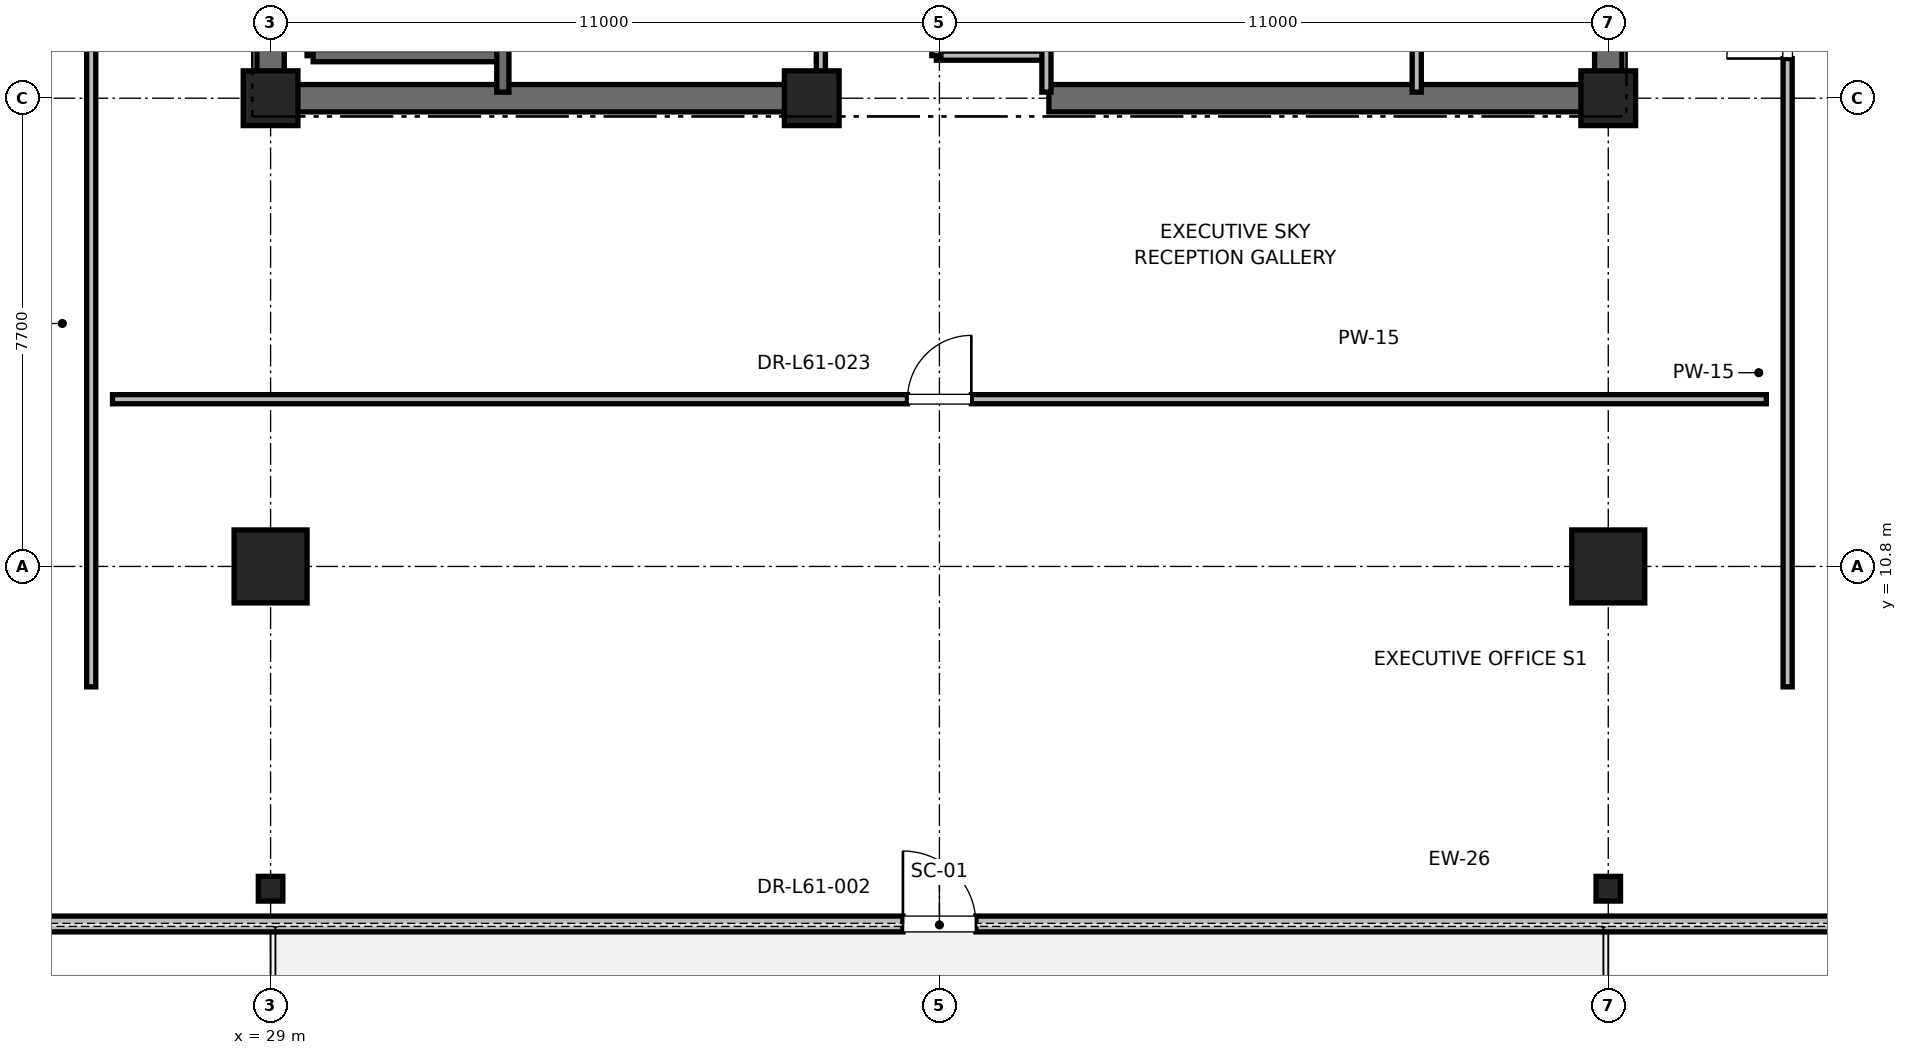
"""IFC4 building model, lengths in metres.
Left out: names, types, materials, properties, quantities, classifications, styles, units other than length and angle.
Written with IfcOpenShell. Run it as: python <this file> out.ifc"""

import sys

from ifc_helpers import new_model, si_unit, direction, frame, frame_2d, origin, origin_2d, place, context, subcontext, project, spatial, rectangle, i_section, extrude, element, fill, save


model = new_model("IFC4")
c1 = context("Model", 3, precision=1e-05, world=origin(), true_north=direction((0.0, 1.0)))
c2 = subcontext(c1, "Body", "Model", "MODEL_VIEW")
j1 = project(units=[si_unit("LENGTHUNIT", "METRE"), si_unit("PLANEANGLEUNIT", "RADIAN")], contexts=[c1])
p1 = place(None, origin())
s1 = spatial("IfcSite", under=j1, at=p1, CompositionType="ELEMENT")
p2 = place(p1, origin())
s2 = spatial("IfcBuilding", under=s1, at=p2, CompositionType="ELEMENT")
p3 = place(p2, frame((0.0, 0.0, 263.2)))
s3 = spatial("IfcBuildingStorey", under=s2, at=p3, CompositionType="ELEMENT", Elevation=263.2)
for number, where, z_axis, x_axis in (
    (1, (29.0, 10.8, 0.0), (0.0, 0.0, 1.0), (1.0, 0.0, 0.0)),
    (2, (51.0, 10.8, 0.0), (0.0, 0.0, 1.0), (1.0, 0.0, 0.0)),
):
    element("IfcColumn", number, at=place(p3, frame(where, z_axis=z_axis, x_axis=x_axis)), inside=s3, PredefinedType="COLUMN", context=c2, shape_type="SweptSolid", body=[
        extrude(rectangle(XDim=1.2, YDim=1.2, at=origin_2d()), origin(), (0.0, 0.0, 1.0), 4.0),
    ])
for number, where, z_axis, x_axis in (
    (3, (29.0, 5.5, 0.0), (0.0, 0.0, 1.0), (1.0, 0.0, 0.0)),
    (4, (51.0, 5.5, 0.0), (0.0, 0.0, 1.0), (1.0, 0.0, 0.0)),
):
    element("IfcColumn", number, at=place(p3, frame(where, z_axis=z_axis, x_axis=x_axis)), inside=s3, PredefinedType="COLUMN", context=c2, shape_type="SweptSolid", body=[
        extrude(i_section(OverallWidth=0.403, OverallDepth=0.406, WebThickness=0.027, FlangeThickness=0.043, FilletRadius=0.015, at=origin_2d()), origin(), (0.0, 0.0, 1.0), 4.0),
    ])
for number, where, z_axis, x_axis in (
    (5, (29.0, 18.5, 0.0), (0.0, 0.0, 1.0), (1.0, 0.0, 0.0)),
    (6, (51.0, 18.5, 0.0), (0.0, 0.0, 1.0), (1.0, 0.0, 0.0)),
    (7, (37.9, 18.5, 0.0), (0.0, 0.0, 1.0), (1.0, 0.0, 0.0)),
):
    element("IfcColumn", number, at=place(p3, frame(where, z_axis=z_axis, x_axis=x_axis)), inside=s3, PredefinedType="PILASTER", context=c2, shape_type="SweptSolid", body=[
        extrude(rectangle(XDim=0.9, YDim=0.9, at=origin_2d()), origin(), (0.0, 0.0, 1.0), 4.0),
    ])
for number, where, z_axis, x_axis in (
    (8, (29.0, 18.5, 0.0), (0.0, 0.0, 1.0), (1.0, 0.0, 0.0)),
    (9, (41.8, 18.5, 0.0), (0.0, 0.0, 1.0), (1.0, 0.0, 0.0)),
):
    element("IfcWall", number, at=place(p3, frame(where, z_axis=z_axis, x_axis=x_axis)), inside=s3, PredefinedType="SHEAR", context=c2, shape_type="SweptSolid", body=[
        extrude(rectangle(XDim=9.2, YDim=0.45, at=frame_2d((4.6, 0.0))), origin(), (0.0, 0.0, 1.0), 3.785),
    ])
p4 = place(p3, frame((29.0, 18.5, 0.0), z_axis=(0.0, 0.0, 1.0), x_axis=(0.0, 1.0, 0.0)))
e10 = element("IfcWall", 10, at=p4, inside=s3, PredefinedType="SHEAR", context=c2, shape_type="SweptSolid", body=[
    extrude(rectangle(XDim=8.8, YDim=0.45, at=frame_2d((4.4, 0.0))), origin(), (0.0, 0.0, 1.0), 3.785),
])
p5 = place(p3, frame((51.0, 18.5, 0.0), z_axis=(0.0, 0.0, 1.0), x_axis=(0.0, 1.0, 0.0)))
e11 = element("IfcWall", 11, at=p5, inside=s3, PredefinedType="SHEAR", context=c2, shape_type="SweptSolid", body=[
    extrude(rectangle(XDim=5.8, YDim=0.45, at=frame_2d((2.9, 0.0))), origin(), (0.0, 0.0, 1.0), 3.785),
])
p6 = place(p3, frame((17.692, 4.92, 0.0), z_axis=(0.0, 0.0, 1.0), x_axis=(1.0, 0.0, 0.0)))
e12 = element("IfcWall", 12, at=p6, inside=s3, PredefinedType="PARAPET", context=c2, shape_type="SweptSolid", body=[
    extrude(rectangle(XDim=44.615, YDim=0.26, at=frame_2d((22.308, 0.0))), origin(), (0.0, 0.0, 1.0), 3.123),
])
p7 = place(p6, frame((4.2, 0.0, 0.85)))
e13 = element("IfcOpeningElement", 13, at=p7, cuts=e12, PredefinedType="OPENING", context=c2, shape_type="SweptSolid", body=[
    extrude(rectangle(XDim=1.6, YDim=2.1, at=frame_2d((0.8, 1.05))), frame((0.0, 0.13, 0.0), z_axis=(0.0, -1.0, 0.0), x_axis=(1.0, 0.0, 0.0)), (0.0, 0.0, 1.0), 0.26),
])
p8 = place(p6, frame((21.708, 0.0, 0.0)))
e14 = element("IfcOpeningElement", 14, at=p8, cuts=e12, PredefinedType="OPENING", context=c2, shape_type="SweptSolid", body=[
    extrude(rectangle(XDim=1.2, YDim=2.2, at=frame_2d((0.6, 1.1))), frame((0.0, 0.13, 0.0), z_axis=(0.0, -1.0, 0.0), x_axis=(1.0, 0.0, 0.0)), (0.0, 0.0, 1.0), 0.26),
])
p9 = place(p6, frame((38.815, 0.0, 0.85)))
e15 = element("IfcOpeningElement", 15, at=p9, cuts=e12, PredefinedType="OPENING", context=c2, shape_type="SweptSolid", body=[
    extrude(rectangle(XDim=1.6, YDim=2.1, at=frame_2d((0.8, 1.05))), frame((0.0, 0.13, 0.0), z_axis=(0.0, -1.0, 0.0), x_axis=(1.0, 0.0, 0.0)), (0.0, 0.0, 1.0), 0.26),
])
p10 = place(p3, frame((29.7, 19.2, 0.0), z_axis=(0.0, 0.0, 1.0), x_axis=(0.0, 1.0, 0.0)))
e16 = element("IfcWall", 16, at=p10, inside=s3, PredefinedType="SOLIDWALL", context=c2, shape_type="SweptSolid", body=[
    extrude(rectangle(XDim=8.15, YDim=0.2, at=frame_2d((4.075, 0.0))), origin(), (0.0, 0.0, 1.0), 3.785),
])
p11 = place(p3, frame((29.7, 19.2, 0.0), z_axis=(0.0, 0.0, 1.0), x_axis=(1.0, 0.0, 0.0)))
e17 = element("IfcWall", 17, at=p11, inside=s3, PredefinedType="SOLIDWALL", context=c2, shape_type="SweptSolid", body=[
    extrude(rectangle(XDim=3.12, YDim=0.2, at=frame_2d((1.56, 0.0))), origin(), (0.0, 0.0, 1.0), 3.785),
])
p12 = place(p3, frame((32.82, 18.6, 0.0), z_axis=(0.0, 0.0, 1.0), x_axis=(0.0, 1.0, 0.0)))
e18 = element("IfcWall", 18, at=p12, inside=s3, PredefinedType="SOLIDWALL", context=c2, shape_type="SweptSolid", body=[
    extrude(rectangle(XDim=8.78, YDim=0.2, at=frame_2d((4.39, 0.0))), origin(), (0.0, 0.0, 1.0), 3.785),
])
p13 = place(p3, frame((39.95, 19.2, 0.0), z_axis=(0.0, 0.0, 1.0), x_axis=(1.0, 0.0, 0.0)))
e19 = element("IfcWall", 19, at=p13, inside=s3, PredefinedType="PARTITIONING", context=c2, shape_type="SweptSolid", body=[
    extrude(rectangle(XDim=1.81, YDim=0.15, at=frame_2d((0.905, 0.0))), origin(), (0.0, 0.0, 1.0), 2.85),
])
p14 = place(p3, frame((41.76, 18.6, 0.0), z_axis=(0.0, 0.0, 1.0), x_axis=(0.0, 1.0, 0.0)))
e20 = element("IfcWall", 20, at=p14, inside=s3, PredefinedType="PARTITIONING", context=c2, shape_type="SweptSolid", body=[
    extrude(rectangle(XDim=3.6, YDim=0.15, at=frame_2d((1.8, 0.0))), origin(), (0.0, 0.0, 1.0), 2.85),
])
p15 = place(p3, frame((39.95, 19.2, 0.0), z_axis=(0.0, 0.0, 1.0), x_axis=(0.0, 1.0, 0.0)))
e21 = element("IfcWall", 21, at=p15, inside=s3, PredefinedType="PARTITIONING", context=c2, shape_type="SweptSolid", body=[
    extrude(rectangle(XDim=3.0, YDim=0.15, at=frame_2d((1.5, 0.0))), origin(), (0.0, 0.0, 1.0), 2.85),
])
p16 = place(p15, frame((1.05, 0.0, 0.0)))
e22 = element("IfcOpeningElement", 22, at=p16, cuts=e21, PredefinedType="OPENING", context=c2, shape_type="SweptSolid", body=[
    extrude(rectangle(XDim=0.9, YDim=2.1, at=frame_2d((0.45, 1.05))), frame((0.0, 0.075, 0.0), z_axis=(0.0, -1.0, 0.0), x_axis=(1.0, 0.0, 0.0)), (0.0, 0.0, 1.0), 0.15),
])
p17 = place(p3, frame((38.05, 18.6, 0.0), z_axis=(0.0, 0.0, 1.0), x_axis=(0.0, 1.0, 0.0)))
e23 = element("IfcWall", 23, at=p17, inside=s3, PredefinedType="PARTITIONING", context=c2, shape_type="SweptSolid", body=[
    extrude(rectangle(XDim=8.78, YDim=0.15, at=frame_2d((4.39, 0.0))), origin(), (0.0, 0.0, 1.0), 2.85),
])
p18 = place(p17, frame((3.89, 0.0, 0.0)))
e24 = element("IfcOpeningElement", 24, at=p18, cuts=e23, PredefinedType="OPENING", context=c2, shape_type="SweptSolid", body=[
    extrude(rectangle(XDim=1.0, YDim=2.15, at=frame_2d((0.5, 1.075))), frame((0.0, 0.075, 0.0), z_axis=(0.0, -1.0, 0.0), x_axis=(1.0, 0.0, 0.0)), (0.0, 0.0, 1.0), 0.15),
])
p19 = place(p3, frame((47.85, 18.6, 0.0), z_axis=(0.0, 0.0, 1.0), x_axis=(0.0, 1.0, 0.0)))
e25 = element("IfcWall", 25, at=p19, inside=s3, PredefinedType="PARTITIONING", context=c2, shape_type="SweptSolid", body=[
    extrude(rectangle(XDim=2.54, YDim=0.15, at=frame_2d((1.27, 0.0))), origin(), (0.0, 0.0, 1.0), 2.85),
])
p20 = place(p3, frame((26.4, 13.55, 0.0), z_axis=(0.0, 0.0, 1.0), x_axis=(1.0, 0.0, 0.0)))
e26 = element("IfcWall", 26, at=p20, inside=s3, PredefinedType="PARTITIONING", context=c2, shape_type="SweptSolid", body=[
    extrude(rectangle(XDim=27.2, YDim=0.15, at=frame_2d((13.6, 0.0))), origin(), (0.0, 0.0, 1.0), 2.85),
])
p21 = place(p20, frame((13.075, 0.0, 0.0)))
e27 = element("IfcOpeningElement", 27, at=p21, cuts=e26, PredefinedType="OPENING", context=c2, shape_type="SweptSolid", body=[
    extrude(rectangle(XDim=1.05, YDim=2.2, at=frame_2d((0.525, 1.1))), frame((0.0, 0.075, 0.0), z_axis=(0.0, -1.0, 0.0), x_axis=(1.0, 0.0, 0.0)), (0.0, 0.0, 1.0), 0.15),
])
p22 = place(p3, frame((26.05, 8.82, 0.0), z_axis=(0.0, 0.0, 1.0), x_axis=(0.0, 1.0, 0.0)))
e28 = element("IfcWall", 28, at=p22, inside=s3, PredefinedType="PARTITIONING", context=c2, shape_type="SweptSolid", body=[
    extrude(rectangle(XDim=15.691, YDim=0.15, at=frame_2d((7.846, 0.0))), origin(), (0.0, 0.0, 1.0), 2.85),
])
p23 = place(p22, frame((11.951, 0.0, 0.0)))
e29 = element("IfcOpeningElement", 29, at=p23, cuts=e28, PredefinedType="OPENING", context=c2, shape_type="SweptSolid", body=[
    extrude(rectangle(XDim=1.5, YDim=2.25, at=frame_2d((0.75, 1.125))), frame((0.0, 0.075, 0.0), z_axis=(0.0, -1.0, 0.0), x_axis=(1.0, 0.0, 0.0)), (0.0, 0.0, 1.0), 0.15),
])
p24 = place(p3, frame((53.95, 8.82, 0.0), z_axis=(0.0, 0.0, 1.0), x_axis=(0.0, 1.0, 0.0)))
e30 = element("IfcWall", 30, at=p24, inside=s3, PredefinedType="PARTITIONING", context=c2, shape_type="SweptSolid", body=[
    extrude(rectangle(XDim=11.955, YDim=0.15, at=frame_2d((5.978, 0.0))), origin(), (0.0, 0.0, 1.0), 2.85),
])
p25 = place(p24, frame((10.333, 0.0, 0.0)))
e31 = element("IfcOpeningElement", 31, at=p25, cuts=e30, PredefinedType="OPENING", context=c2, shape_type="SweptSolid", body=[
    extrude(rectangle(XDim=1.0, YDim=2.15, at=frame_2d((0.5, 1.075))), frame((0.0, 0.075, 0.0), z_axis=(0.0, -1.0, 0.0), x_axis=(1.0, 0.0, 0.0)), (0.0, 0.0, 1.0), 0.15),
])
p26 = place(p8, origin())
e32 = element("IfcDoor", 32, at=p26, inside=s3, OperationType="SINGLE_SWING_LEFT", PredefinedType="DOOR", context=c2, shape_type="SweptSolid", body=[
    extrude(rectangle(XDim=1.2, YDim=2.2, at=frame_2d((0.6, 1.1))), frame((0.0, 0.025, 0.0), z_axis=(0.0, -1.0, 0.0), x_axis=(1.0, 0.0, 0.0)), (0.0, 0.0, 1.0), 0.05),
])
fill(e14, e32)
p27 = place(p21, origin())
e33 = element("IfcDoor", 33, at=p27, inside=s3, OperationType="SINGLE_SWING_RIGHT", PredefinedType="DOOR", context=c2, shape_type="SweptSolid", body=[
    extrude(rectangle(XDim=1.05, YDim=2.2, at=frame_2d((0.525, 1.1))), frame((0.0, 0.025, 0.0), z_axis=(0.0, -1.0, 0.0), x_axis=(1.0, 0.0, 0.0)), (0.0, 0.0, 1.0), 0.05),
])
fill(e27, e33)
p28 = place(p25, origin())
e34 = element("IfcDoor", 34, at=p28, inside=s3, OperationType="SINGLE_SWING_LEFT", PredefinedType="DOOR", context=c2, shape_type="SweptSolid", body=[
    extrude(rectangle(XDim=1.0, YDim=2.15, at=frame_2d((0.5, 1.075))), frame((0.0, 0.025, 0.0), z_axis=(0.0, -1.0, 0.0), x_axis=(1.0, 0.0, 0.0)), (0.0, 0.0, 1.0), 0.05),
])
fill(e31, e34)
save(model, sys.argv[1])
